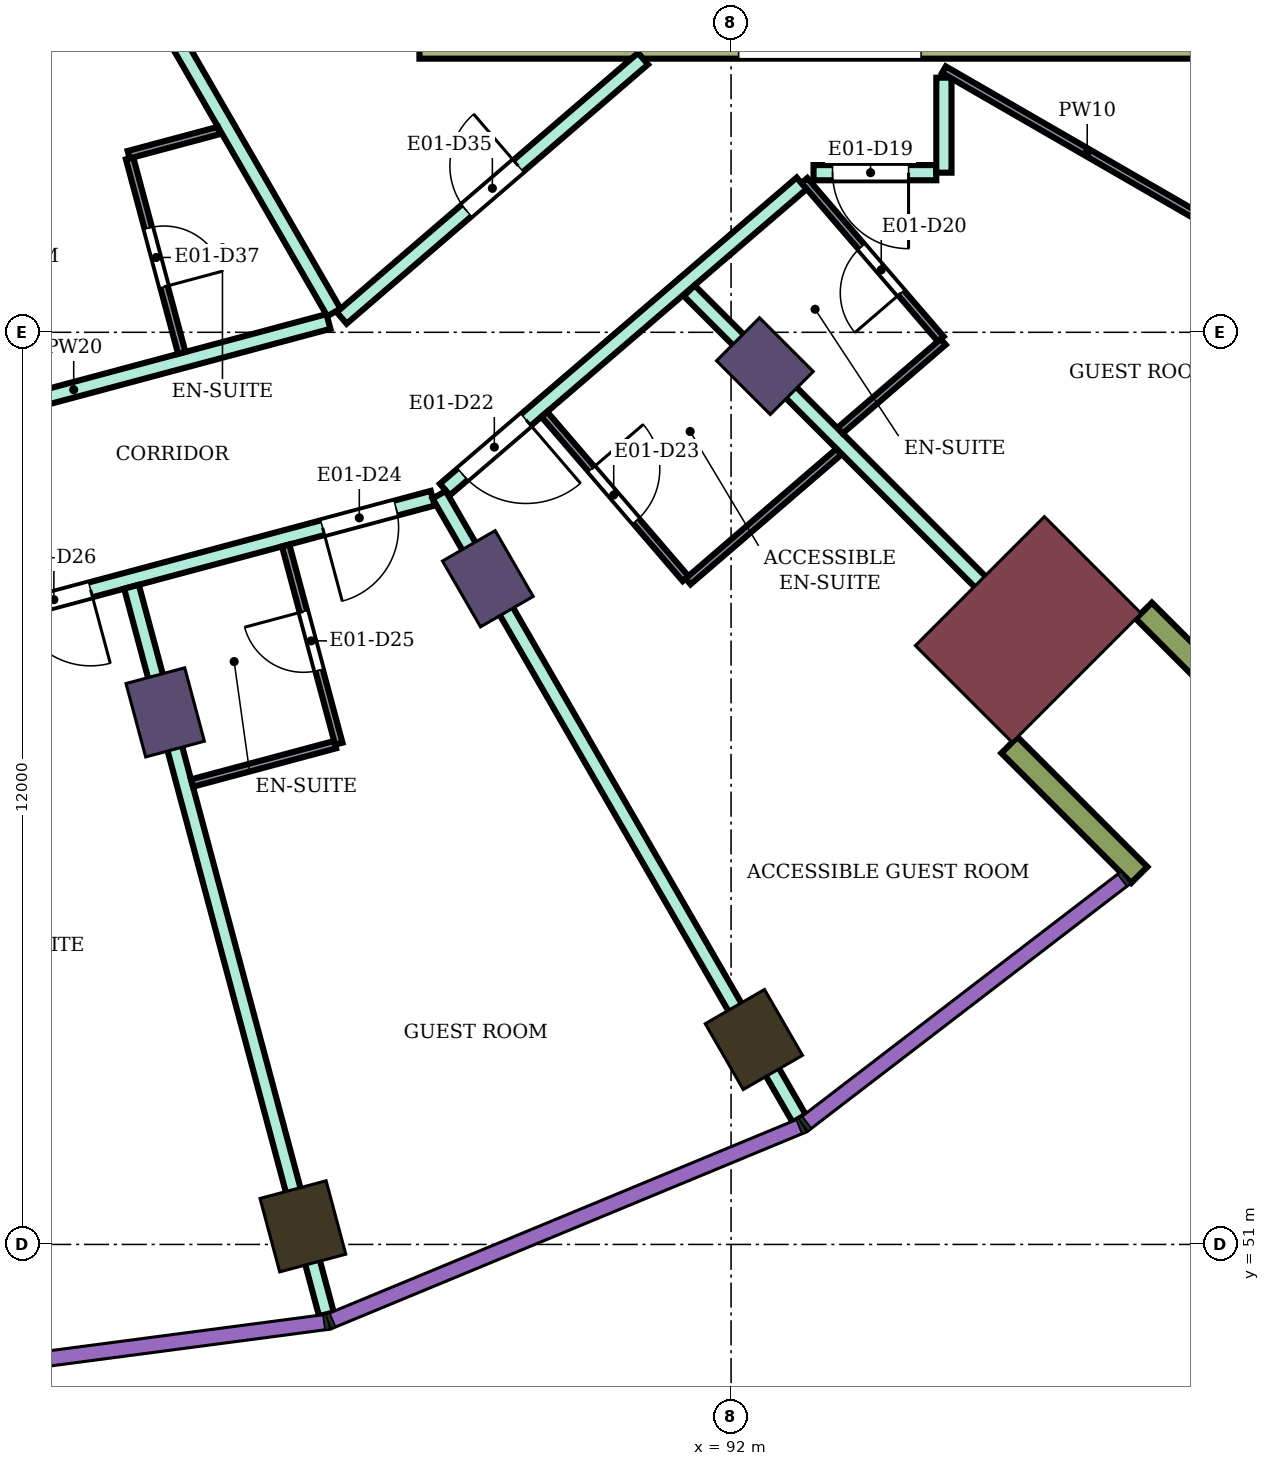
"""IFC4 building model, lengths in metres.
Left out: names, types, materials, properties, quantities, classifications, styles, units other than length and angle.
Written with IfcOpenShell. Run it as: python <this file> out.ifc"""

import sys

from ifc_helpers import new_model, si_unit, direction, frame, frame_2d, origin, origin_2d, place, context, subcontext, project, spatial, rectangle, extrude, element, fill, save


model = new_model("IFC4")
c1 = context("Model", 3, precision=1e-05, world=origin(), true_north=direction((0.0, 1.0)))
c2 = subcontext(c1, "Body", "Model", "MODEL_VIEW")
j1 = project(units=[si_unit("LENGTHUNIT", "METRE"), si_unit("PLANEANGLEUNIT", "RADIAN")], contexts=[c1])
p1 = place(None, origin())
s1 = spatial("IfcSite", under=j1, at=p1, CompositionType="ELEMENT")
p2 = place(p1, origin())
s2 = spatial("IfcBuilding", under=s1, at=p2, CompositionType="ELEMENT")
p3 = place(p2, frame((0.0, 0.0, 122.4)))
s3 = spatial("IfcBuildingStorey", under=s2, at=p3, CompositionType="ELEMENT", Elevation=122.4)
for number, where, z_axis, x_axis in (
    (1, (86.367, 51.238, 0.0), (0.0, 0.0, 1.0), (0.259, -0.966, 0.0)),
    (2, (92.3, 53.696, 0.0), (0.0, 0.0, 1.0), (0.5, -0.866, 0.0)),
):
    element("IfcColumn", number, at=place(p3, frame(where, z_axis=z_axis, x_axis=x_axis)), inside=s3, PredefinedType="COLUMN", context=c2, shape_type="SweptSolid", body=[
        extrude(rectangle(XDim=1.0, YDim=0.9, at=origin_2d()), origin(), (0.0, 0.0, 1.0), 3.9),
    ])
for number, where, z_axis, x_axis in (
    (3, (84.555, 58.0, 0.0), (0.0, 0.0, 1.0), (0.259, -0.966, 0.0)),
    (4, (88.8, 59.758, 0.0), (0.0, 0.0, 1.0), (0.5, -0.866, 0.0)),
    (5, (92.445, 62.555, 0.0), (0.0, 0.0, 1.0), (0.707, -0.707, 0.0)),
):
    element("IfcColumn", number, at=place(p3, frame(where, z_axis=z_axis, x_axis=x_axis)), inside=s3, PredefinedType="COLUMN", context=c2, shape_type="SweptSolid", body=[
        extrude(rectangle(XDim=1.0, YDim=0.8, at=origin_2d()), origin(), (0.0, 0.0, 1.0), 3.9),
    ])
p4 = place(p3, frame((95.91, 59.09, 0.0), z_axis=(0.0, 0.0, 1.0), x_axis=(0.707106781187, -0.707106781187, 0.0)))
e6 = element("IfcColumn", 6, at=p4, inside=s3, PredefinedType="COLUMN", context=c2, shape_type="SweptSolid", body=[
    extrude(rectangle(XDim=1.8, YDim=2.4, at=origin_2d()), origin(), (0.0, 0.0, 1.0), 3.9),
])
p5 = place(p3, frame((87.9, 66.95, 0.0), z_axis=(0.0, 0.0, 1.0), x_axis=(1.0, 0.0, 0.0)))
e7 = element("IfcWall", 7, at=p5, inside=s3, PredefinedType="SHEAR", context=c2, shape_type="SweptSolid", body=[
    extrude(rectangle(XDim=14.8, YDim=0.7, at=frame_2d((7.4, 0.0))), origin(), (0.0, 0.0, 1.0), 3.58),
])
p6 = place(p5, frame((4.2, 0.0, 0.0)))
e8 = element("IfcOpeningElement", 8, at=p6, cuts=e7, PredefinedType="OPENING", context=c2, shape_type="SweptSolid", body=[
    extrude(rectangle(XDim=2.4, YDim=2.4, at=frame_2d((1.2, 1.2))), frame((0.0, 0.36, 0.0), z_axis=(0.0, -1.0, 0.0), x_axis=(1.0, 0.0, 0.0)), (0.0, 0.0, 1.0), 0.72),
])
for number, where, z_axis, x_axis in (
    (9, (95.662, 57.57, 0.0), (0.0, 0.0, 1.0), (0.707, -0.707, 0.0)),
    (10, (97.43, 59.338, 0.0), (0.0, 0.0, 1.0), (0.707, -0.707, 0.0)),
):
    element("IfcWall", number, at=place(p3, frame(where, z_axis=z_axis, x_axis=x_axis)), inside=s3, PredefinedType="NOTDEFINED", context=c2, shape_type="SweptSolid", body=[
        extrude(rectangle(XDim=2.416, YDim=0.3, at=frame_2d((1.208, 0.0))), origin(), (0.0, 0.0, 1.0), 3.9),
    ])
p7 = place(p3, frame((80.0, 58.655, 0.0), z_axis=(0.0, 0.0, 1.0), x_axis=(0.965967338894, 0.258664068224, 0.0)))
e11 = element("IfcWall", 11, at=p7, inside=s3, PredefinedType="PARTITIONING", context=c2, shape_type="SweptSolid", body=[
    extrude(rectangle(XDim=8.36, YDim=0.2, at=frame_2d((4.18, 0.0))), origin(), (0.0, 0.0, 1.0), 3.45),
])
p8 = place(p7, frame((6.86, 0.0, 0.0)))
e12 = element("IfcOpeningElement", 12, at=p8, cuts=e11, PredefinedType="OPENING", context=c2, shape_type="SweptSolid", body=[
    extrude(rectangle(XDim=1.0, YDim=2.1, at=frame_2d((0.5, 1.05))), frame((0.0, 0.11, 0.0), z_axis=(0.0, -1.0, 0.0), x_axis=(1.0, 0.0, 0.0)), (0.0, 0.0, 1.0), 0.22),
])
p9 = place(p7, frame((2.7, 0.0, 0.0)))
e13 = element("IfcOpeningElement", 13, at=p9, cuts=e11, PredefinedType="OPENING", context=c2, shape_type="SweptSolid", body=[
    extrude(rectangle(XDim=1.0, YDim=2.1, at=frame_2d((0.5, 1.05))), frame((0.0, 0.11, 0.0), z_axis=(0.0, -1.0, 0.0), x_axis=(1.0, 0.0, 0.0)), (0.0, 0.0, 1.0), 0.22),
])
p10 = place(p3, frame((80.0, 61.346, 0.0), z_axis=(0.0, 0.0, 1.0), x_axis=(0.965924181808, 0.258825182312, 0.0)))
e14 = element("IfcWall", 14, at=p10, inside=s3, PredefinedType="PARTITIONING", context=c2, shape_type="SweptSolid", body=[
    extrude(rectangle(XDim=6.94, YDim=0.2, at=frame_2d((3.47, 0.0))), origin(), (0.0, 0.0, 1.0), 3.45),
])
p11 = place(p10, frame((0.55, 0.0, 0.0)))
e15 = element("IfcOpeningElement", 15, at=p11, cuts=e14, PredefinedType="OPENING", context=c2, shape_type="SweptSolid", body=[
    extrude(rectangle(XDim=1.0, YDim=2.1, at=frame_2d((0.5, 1.05))), frame((0.0, 0.11, 0.0), z_axis=(0.0, -1.0, 0.0), x_axis=(1.0, 0.0, 0.0)), (0.0, 0.0, 1.0), 0.22),
])
p12 = place(p3, frame((83.848, 68.332, 0.0), z_axis=(0.0, 0.0, 1.0), x_axis=(0.499933000352, -0.866064082594, 0.0)))
e16 = element("IfcWall", 16, at=p12, inside=s3, PredefinedType="PARTITIONING", context=c2, shape_type="SweptSolid", body=[
    extrude(rectangle(XDim=5.855, YDim=0.2, at=frame_2d((2.928, 0.0))), origin(), (0.0, 0.0, 1.0), 3.45),
])
p13 = place(p3, frame((84.112, 59.652, 0.0), z_axis=(0.0, 0.0, 1.0), x_axis=(0.258838718107, -0.965920554709, 0.0)))
e17 = element("IfcWall", 17, at=p13, inside=s3, PredefinedType="PARTITIONING", context=c2, shape_type="SweptSolid", body=[
    extrude(rectangle(XDim=9.908, YDim=0.2, at=frame_2d((4.954, 0.0))), origin(), (0.0, 0.0, 1.0), 3.45),
])
p14 = place(p3, frame((86.877, 63.189, 0.0), z_axis=(0.0, 0.0, 1.0), x_axis=(0.758075808328, 0.652166442581, 0.0)))
e18 = element("IfcWall", 18, at=p14, inside=s3, PredefinedType="PARTITIONING", context=c2, shape_type="SweptSolid", body=[
    extrude(rectangle(XDim=5.23, YDim=0.2, at=frame_2d((2.615, 0.0))), origin(), (0.0, 0.0, 1.0), 3.45),
])
p15 = place(p14, frame((2.165, 0.0, 0.0)))
e19 = element("IfcOpeningElement", 19, at=p15, cuts=e18, PredefinedType="OPENING", context=c2, shape_type="SweptSolid", body=[
    extrude(rectangle(XDim=0.9, YDim=2.1, at=frame_2d((0.45, 1.05))), frame((0.0, 0.11, 0.0), z_axis=(0.0, -1.0, 0.0), x_axis=(1.0, 0.0, 0.0)), (0.0, 0.0, 1.0), 0.22),
])
p16 = place(p3, frame((88.235, 60.931, 0.0), z_axis=(0.0, 0.0, 1.0), x_axis=(0.758816241808, 0.651304775945, 0.0)))
e20 = element("IfcWall", 20, at=p16, inside=s3, PredefinedType="PARTITIONING", context=c2, shape_type="SweptSolid", body=[
    extrude(rectangle(XDim=6.186, YDim=0.2, at=frame_2d((3.093, 0.0))), origin(), (0.0, 0.0, 1.0), 3.45),
])
p17 = place(p16, frame((0.308, 0.0, 0.0)))
e21 = element("IfcOpeningElement", 21, at=p17, cuts=e20, PredefinedType="OPENING", context=c2, shape_type="SweptSolid", body=[
    extrude(rectangle(XDim=1.1, YDim=2.1, at=frame_2d((0.55, 1.05))), frame((0.0, 0.11, 0.0), z_axis=(0.0, -1.0, 0.0), x_axis=(1.0, 0.0, 0.0)), (0.0, 0.0, 1.0), 0.22),
])
p18 = place(p3, frame((88.159, 60.863, 0.0), z_axis=(0.0, 0.0, 1.0), x_axis=(0.499935840196, -0.866062443296, 0.0)))
e22 = element("IfcWall", 22, at=p18, inside=s3, PredefinedType="PARTITIONING", context=c2, shape_type="SweptSolid", body=[
    extrude(rectangle(XDim=9.475, YDim=0.2, at=frame_2d((4.737, 0.0))), origin(), (0.0, 0.0, 1.0), 3.45),
])
p19 = place(p3, frame((91.449, 63.548, 0.0), z_axis=(0.0, 0.0, 1.0), x_axis=(0.706984804638, -0.707228736698, 0.0)))
e23 = element("IfcWall", 23, at=p19, inside=s3, PredefinedType="PARTITIONING", context=c2, shape_type="SweptSolid", body=[
    extrude(rectangle(XDim=7.006, YDim=0.2, at=frame_2d((3.503, 0.0))), origin(), (0.0, 0.0, 1.0), 3.45),
])
p20 = place(p3, frame((93.085, 65.1, 0.0), z_axis=(0.0, 0.0, 1.0), x_axis=(1.0, 0.0, 0.0)))
e24 = element("IfcWall", 24, at=p20, inside=s3, PredefinedType="PARTITIONING", context=c2, shape_type="SweptSolid", body=[
    extrude(rectangle(XDim=1.615, YDim=0.2, at=frame_2d((0.808, 0.0))), origin(), (0.0, 0.0, 1.0), 3.45),
])
p21 = place(p20, frame((0.25, 0.0, 0.0)))
e25 = element("IfcOpeningElement", 25, at=p21, cuts=e24, PredefinedType="OPENING", context=c2, shape_type="SweptSolid", body=[
    extrude(rectangle(XDim=1.0, YDim=2.1, at=frame_2d((0.5, 1.05))), frame((0.0, 0.11, 0.0), z_axis=(0.0, -1.0, 0.0), x_axis=(1.0, 0.0, 0.0)), (0.0, 0.0, 1.0), 0.22),
])
p22 = place(p3, frame((94.8, 65.1, 0.0), z_axis=(0.0, 0.0, 1.0), x_axis=(0.0, 1.0, 0.0)))
e26 = element("IfcWall", 26, at=p22, inside=s3, PredefinedType="PARTITIONING", context=c2, shape_type="SweptSolid", body=[
    extrude(rectangle(XDim=1.25, YDim=0.2, at=frame_2d((0.625, 0.0))), origin(), (0.0, 0.0, 1.0), 3.45),
])
p23 = place(p3, frame((84.087, 65.289, 0.0), z_axis=(0.0, 0.0, 1.0), x_axis=(0.258929459649, -0.965896234037, 0.0)))
e27 = element("IfcWall", 27, at=p23, inside=s3, PredefinedType="PARTITIONING", context=c2, shape_type="SweptSolid", body=[
    extrude(rectangle(XDim=2.65, YDim=0.1, at=frame_2d((1.325, 0.0))), origin(), (0.0, 0.0, 1.0), 3.45),
])
p24 = place(p23, frame((0.95, 0.0, 0.0)))
e28 = element("IfcOpeningElement", 28, at=p24, cuts=e27, PredefinedType="OPENING", context=c2, shape_type="SweptSolid", body=[
    extrude(rectangle(XDim=0.8, YDim=2.1, at=frame_2d((0.4, 1.05))), frame((0.0, 0.06, 0.0), z_axis=(0.0, -1.0, 0.0), x_axis=(1.0, 0.0, 0.0)), (0.0, 0.0, 1.0), 0.12),
])
p25 = place(p3, frame((84.074, 65.337, 0.0), z_axis=(0.0, 0.0, 1.0), x_axis=(0.965914351064, 0.258861867428, 0.0)))
e29 = element("IfcWall", 29, at=p25, inside=s3, PredefinedType="PARTITIONING", context=c2, shape_type="SweptSolid", body=[
    extrude(rectangle(XDim=1.229, YDim=0.1, at=frame_2d((0.615, 0.0))), origin(), (0.0, 0.0, 1.0), 3.45),
])
p26 = place(p3, frame((84.908, 57.07, 0.0), z_axis=(0.0, 0.0, 1.0), x_axis=(0.965853538138, 0.25908867761, 0.0)))
e30 = element("IfcWall", 30, at=p26, inside=s3, PredefinedType="PARTITIONING", context=c2, shape_type="SweptSolid", body=[
    extrude(rectangle(XDim=1.95, YDim=0.1, at=frame_2d((0.975, 0.0))), origin(), (0.0, 0.0, 1.0), 3.45),
])
p27 = place(p3, frame((86.14, 60.196, 0.0), z_axis=(0.0, 0.0, 1.0), x_axis=(0.258945475746, -0.965891940432, 0.0)))
e31 = element("IfcWall", 31, at=p27, inside=s3, PredefinedType="PARTITIONING", context=c2, shape_type="SweptSolid", body=[
    extrude(rectangle(XDim=2.7, YDim=0.1, at=frame_2d((1.35, 0.0))), origin(), (0.0, 0.0, 1.0), 3.45),
])
p28 = place(p27, frame((0.9, 0.0, 0.0)))
e32 = element("IfcOpeningElement", 32, at=p28, cuts=e31, PredefinedType="OPENING", context=c2, shape_type="SweptSolid", body=[
    extrude(rectangle(XDim=0.8, YDim=2.1, at=frame_2d((0.4, 1.05))), frame((0.0, 0.06, 0.0), z_axis=(0.0, -1.0, 0.0), x_axis=(1.0, 0.0, 0.0)), (0.0, 0.0, 1.0), 0.12),
])
p29 = place(p3, frame((89.543, 61.921, 0.0), z_axis=(0.0, 0.0, 1.0), x_axis=(0.651996917864, -0.758221616083, 0.0)))
e33 = element("IfcWall", 33, at=p29, inside=s3, PredefinedType="PARTITIONING", context=c2, shape_type="SweptSolid", body=[
    extrude(rectangle(XDim=2.85, YDim=0.1, at=frame_2d((1.425, 0.0))), origin(), (0.0, 0.0, 1.0), 3.45),
])
p30 = place(p29, frame((0.95, 0.0, 0.0)))
e34 = element("IfcOpeningElement", 34, at=p30, cuts=e33, PredefinedType="OPENING", context=c2, shape_type="SweptSolid", body=[
    extrude(rectangle(XDim=0.9, YDim=2.1, at=frame_2d((0.45, 1.05))), frame((0.0, 0.06, 0.0), z_axis=(0.0, -1.0, 0.0), x_axis=(1.0, 0.0, 0.0)), (0.0, 0.0, 1.0), 0.12),
])
p31 = place(p3, frame((91.434, 59.722, 0.0), z_axis=(0.0, 0.0, 1.0), x_axis=(0.758076316785, 0.652165851552, 0.0)))
e35 = element("IfcWall", 35, at=p31, inside=s3, PredefinedType="PARTITIONING", context=c2, shape_type="SweptSolid", body=[
    extrude(rectangle(XDim=2.616, YDim=0.1, at=frame_2d((1.308, 0.0))), origin(), (0.0, 0.0, 1.0), 3.45),
])
p32 = place(p3, frame((92.965, 64.997, 0.0), z_axis=(0.0, 0.0, 1.0), x_axis=(0.652069888227, -0.758158862553, 0.0)))
e36 = element("IfcWall", 36, at=p32, inside=s3, PredefinedType="PARTITIONING", context=c2, shape_type="SweptSolid", body=[
    extrude(rectangle(XDim=2.75, YDim=0.1, at=frame_2d((1.375, 0.0))), origin(), (0.0, 0.0, 1.0), 3.45),
])
p33 = place(p32, frame((1.15, 0.0, 0.0)))
e37 = element("IfcOpeningElement", 37, at=p33, cuts=e36, PredefinedType="OPENING", context=c2, shape_type="SweptSolid", body=[
    extrude(rectangle(XDim=0.8, YDim=2.1, at=frame_2d((0.4, 1.05))), frame((0.0, 0.06, 0.0), z_axis=(0.0, -1.0, 0.0), x_axis=(1.0, 0.0, 0.0)), (0.0, 0.0, 1.0), 0.12),
])
p34 = place(p3, frame((93.435, 61.707, 0.0), z_axis=(0.0, 0.0, 1.0), x_axis=(0.758070495124, 0.652172618578, 0.0)))
e38 = element("IfcWall", 38, at=p34, inside=s3, PredefinedType="PARTITIONING", context=c2, shape_type="SweptSolid", body=[
    extrude(rectangle(XDim=1.789, YDim=0.1, at=frame_2d((0.895, 0.0))), origin(), (0.0, 0.0, 1.0), 3.45),
])
p35 = place(p3, frame((94.8, 66.455, 0.0), z_axis=(0.0, 0.0, 1.0), x_axis=(0.86602264145, -0.500004784474, 0.0)))
e39 = element("IfcWall", 39, at=p35, inside=s3, PredefinedType="PARTITIONING", context=c2, shape_type="SweptSolid", body=[
    extrude(rectangle(XDim=8.708, YDim=0.1, at=frame_2d((4.354, 0.0))), origin(), (0.0, 0.0, 1.0), 3.45),
])
p36 = place(p35, frame((3.879, 0.0, 0.0)))
e40 = element("IfcOpeningElement", 40, at=p36, cuts=e39, PredefinedType="OPENING", context=c2, shape_type="SweptSolid", body=[
    extrude(rectangle(XDim=0.9, YDim=2.1, at=frame_2d((0.45, 1.05))), frame((0.0, 0.06, 0.0), z_axis=(0.0, -1.0, 0.0), x_axis=(1.0, 0.0, 0.0)), (0.0, 0.0, 1.0), 0.12),
])
p37 = place(p21, frame((1.0, 0.0, 0.0), z_axis=(0.0, 0.0, 1.0), x_axis=(-1.0, 0.0, 0.0)))
e41 = element("IfcDoor", 41, at=p37, inside=s3, OperationType="SINGLE_SWING_LEFT", PredefinedType="DOOR", context=c2, shape_type="SweptSolid", body=[
    extrude(rectangle(XDim=1.0, YDim=2.1, at=frame_2d((0.5, 1.05))), frame((0.0, 0.025, 0.0), z_axis=(0.0, -1.0, 0.0), x_axis=(1.0, 0.0, 0.0)), (0.0, 0.0, 1.0), 0.05),
])
fill(e25, e41)
p38 = place(p33, frame((0.8, 0.0, 0.0), z_axis=(0.0, 0.0, 1.0), x_axis=(-1.0, 0.0, 0.0)))
e42 = element("IfcDoor", 42, at=p38, inside=s3, OperationType="SINGLE_SWING_LEFT", PredefinedType="DOOR", context=c2, shape_type="SweptSolid", body=[
    extrude(rectangle(XDim=0.8, YDim=2.1, at=frame_2d((0.4, 1.05))), frame((0.0, 0.025, 0.0), z_axis=(0.0, -1.0, 0.0), x_axis=(1.0, 0.0, 0.0)), (0.0, 0.0, 1.0), 0.05),
])
fill(e37, e42)
p39 = place(p17, frame((1.1, 0.0, 0.0), z_axis=(0.0, 0.0, 1.0), x_axis=(-1.0, 0.0, 0.0)))
e43 = element("IfcDoor", 43, at=p39, inside=s3, OperationType="SINGLE_SWING_LEFT", PredefinedType="DOOR", context=c2, shape_type="SweptSolid", body=[
    extrude(rectangle(XDim=1.1, YDim=2.1, at=frame_2d((0.55, 1.05))), frame((0.0, 0.025, 0.0), z_axis=(0.0, -1.0, 0.0), x_axis=(1.0, 0.0, 0.0)), (0.0, 0.0, 1.0), 0.05),
])
fill(e21, e43)
p40 = place(p30, origin())
e44 = element("IfcDoor", 44, at=p40, inside=s3, OperationType="SINGLE_SWING_LEFT", PredefinedType="DOOR", context=c2, shape_type="SweptSolid", body=[
    extrude(rectangle(XDim=0.9, YDim=2.1, at=frame_2d((0.45, 1.05))), frame((0.0, 0.025, 0.0), z_axis=(0.0, -1.0, 0.0), x_axis=(1.0, 0.0, 0.0)), (0.0, 0.0, 1.0), 0.05),
])
fill(e34, e44)
p41 = place(p8, frame((1.0, 0.0, 0.0), z_axis=(0.0, 0.0, 1.0), x_axis=(-1.0, 0.0, 0.0)))
e45 = element("IfcDoor", 45, at=p41, inside=s3, OperationType="SINGLE_SWING_RIGHT", PredefinedType="DOOR", context=c2, shape_type="SweptSolid", body=[
    extrude(rectangle(XDim=1.0, YDim=2.1, at=frame_2d((0.5, 1.05))), frame((0.0, 0.025, 0.0), z_axis=(0.0, -1.0, 0.0), x_axis=(1.0, 0.0, 0.0)), (0.0, 0.0, 1.0), 0.05),
])
fill(e12, e45)
p42 = place(p28, frame((0.8, 0.0, 0.0), z_axis=(0.0, 0.0, 1.0), x_axis=(-1.0, 0.0, 0.0)))
e46 = element("IfcDoor", 46, at=p42, inside=s3, OperationType="SINGLE_SWING_RIGHT", PredefinedType="DOOR", context=c2, shape_type="SweptSolid", body=[
    extrude(rectangle(XDim=0.8, YDim=2.1, at=frame_2d((0.4, 1.05))), frame((0.0, 0.025, 0.0), z_axis=(0.0, -1.0, 0.0), x_axis=(1.0, 0.0, 0.0)), (0.0, 0.0, 1.0), 0.05),
])
fill(e32, e46)
p43 = place(p9, frame((1.0, 0.0, 0.0), z_axis=(0.0, 0.0, 1.0), x_axis=(-1.0, 0.0, 0.0)))
e47 = element("IfcDoor", 47, at=p43, inside=s3, OperationType="SINGLE_SWING_LEFT", PredefinedType="DOOR", context=c2, shape_type="SweptSolid", body=[
    extrude(rectangle(XDim=1.0, YDim=2.1, at=frame_2d((0.5, 1.05))), frame((0.0, 0.025, 0.0), z_axis=(0.0, -1.0, 0.0), x_axis=(1.0, 0.0, 0.0)), (0.0, 0.0, 1.0), 0.05),
])
fill(e13, e47)
p44 = place(p15, origin())
e48 = element("IfcDoor", 48, at=p44, inside=s3, OperationType="SINGLE_SWING_RIGHT", PredefinedType="DOOR", context=c2, shape_type="SweptSolid", body=[
    extrude(rectangle(XDim=0.9, YDim=2.1, at=frame_2d((0.45, 1.05))), frame((0.0, 0.025, 0.0), z_axis=(0.0, -1.0, 0.0), x_axis=(1.0, 0.0, 0.0)), (0.0, 0.0, 1.0), 0.05),
])
fill(e19, e48)
p45 = place(p24, origin())
e49 = element("IfcDoor", 49, at=p45, inside=s3, OperationType="SINGLE_SWING_RIGHT", PredefinedType="DOOR", context=c2, shape_type="SweptSolid", body=[
    extrude(rectangle(XDim=0.8, YDim=2.1, at=frame_2d((0.4, 1.05))), frame((0.0, 0.025, 0.0), z_axis=(0.0, -1.0, 0.0), x_axis=(1.0, 0.0, 0.0)), (0.0, 0.0, 1.0), 0.05),
])
fill(e28, e49)
save(model, sys.argv[1])
